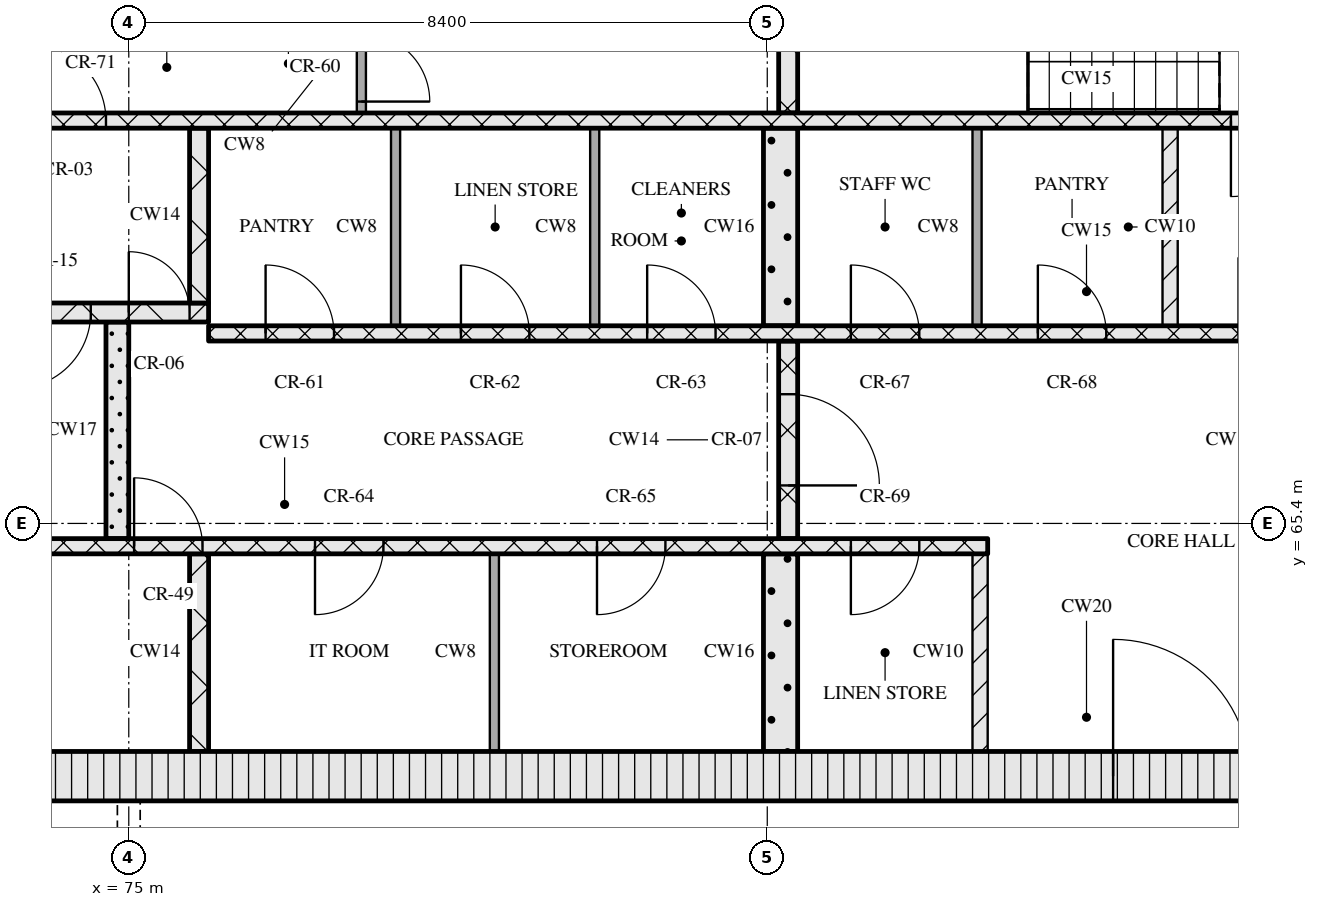
"""IFC4 building model, lengths in metres.
Left out: names, types, materials, properties, quantities, classifications, styles, units other than length and angle.
Written with IfcOpenShell. Run it as: python <this file> out.ifc"""

import sys

from ifc_helpers import new_model, si_unit, direction, frame, frame_2d, origin, place, context, subcontext, project, spatial, rectangle, extrude, element, fill, save


model = new_model("IFC4")
c1 = context("Model", 3, precision=1e-05, world=origin(), true_north=direction((0.0, 1.0)))
c2 = subcontext(c1, "Body", "Model", "MODEL_VIEW")
j1 = project(units=[si_unit("LENGTHUNIT", "METRE"), si_unit("PLANEANGLEUNIT", "RADIAN")], contexts=[c1])
p1 = place(None, origin())
s1 = spatial("IfcSite", under=j1, at=p1, CompositionType="ELEMENT")
p2 = place(p1, origin())
s2 = spatial("IfcBuilding", under=s1, at=p2, CompositionType="ELEMENT")
p3 = place(p2, frame((0.0, 0.0, 241.5)))
s3 = spatial("IfcBuildingStorey", under=s2, at=p3, CompositionType="ELEMENT", Elevation=241.5)
p4 = place(p3, frame((67.15, 62.075, 0.0), z_axis=(0.0, 0.0, 1.0), x_axis=(1.0, 0.0, 0.0)))
e1 = element("IfcWall", 1, at=p4, inside=s3, PredefinedType="SOLIDWALL", context=c2, shape_type="SweptSolid", body=[
    extrude(rectangle(XDim=40.9, YDim=0.65, at=frame_2d((20.45, 0.0))), origin(), (0.0, 0.0, 1.0), 3.32),
])
p5 = place(p4, frame((20.8, 0.0, 0.0)))
e2 = element("IfcOpeningElement", 2, at=p5, cuts=e1, PredefinedType="OPENING", context=c2, shape_type="SweptSolid", body=[
    extrude(rectangle(XDim=1.8, YDim=2.1, at=frame_2d((0.9, 1.05))), frame((0.0, 0.335, 0.0), z_axis=(0.0, -1.0, 0.0), x_axis=(1.0, 0.0, 0.0)), (0.0, 0.0, 1.0), 0.67),
])
p6 = place(p3, frame((75.925, 62.4, 0.0), z_axis=(0.0, 0.0, 1.0), x_axis=(0.0, 1.0, 0.0)))
e3 = element("IfcWall", 3, at=p6, inside=s3, PredefinedType="SOLIDWALL", context=c2, shape_type="SweptSolid", body=[
    extrude(rectangle(XDim=2.6, YDim=0.25, at=frame_2d((1.3, 0.0))), origin(), (0.0, 0.0, 1.0), 3.32),
])
p7 = place(p3, frame((79.81, 62.4, 0.0), z_axis=(0.0, 0.0, 1.0), x_axis=(0.0, 1.0, 0.0)))
e4 = element("IfcWall", 4, at=p7, inside=s3, PredefinedType="PARTITIONING", context=c2, shape_type="SweptSolid", body=[
    extrude(rectangle(XDim=2.6, YDim=0.12, at=frame_2d((1.3, 0.0))), origin(), (0.0, 0.0, 1.0), 3.32),
])
p8 = place(p3, frame((83.575, 62.4, 0.0), z_axis=(0.0, 0.0, 1.0), x_axis=(0.0, 1.0, 0.0)))
e5 = element("IfcWall", 5, at=p8, inside=s3, PredefinedType="SOLIDWALL", context=c2, shape_type="SweptSolid", body=[
    extrude(rectangle(XDim=2.6, YDim=0.45, at=frame_2d((1.3, 0.0))), origin(), (0.0, 0.0, 1.0), 3.32),
])
p9 = place(p3, frame((86.2, 62.4, 0.0), z_axis=(0.0, 0.0, 1.0), x_axis=(0.0, 1.0, 0.0)))
e6 = element("IfcWall", 6, at=p9, inside=s3, PredefinedType="PARTITIONING", context=c2, shape_type="SweptSolid", body=[
    extrude(rectangle(XDim=2.6, YDim=0.2, at=frame_2d((1.3, 0.0))), origin(), (0.0, 0.0, 1.0), 3.32),
])
p10 = place(p3, frame((67.8, 65.1, 0.0), z_axis=(0.0, 0.0, 1.0), x_axis=(1.0, 0.0, 0.0)))
e7 = element("IfcWall", 7, at=p10, inside=s3, PredefinedType="SOLIDWALL", context=c2, shape_type="SweptSolid", body=[
    extrude(rectangle(XDim=18.5, YDim=0.2, at=frame_2d((9.25, 0.0))), origin(), (0.0, 0.0, 1.0), 3.32),
])
p11 = place(p10, frame((7.27, 0.0, 0.0)))
e8 = element("IfcOpeningElement", 8, at=p11, cuts=e7, PredefinedType="OPENING", context=c2, shape_type="SweptSolid", body=[
    extrude(rectangle(XDim=0.9, YDim=2.1, at=frame_2d((0.45, 1.05))), frame((0.0, 0.11, 0.0), z_axis=(0.0, -1.0, 0.0), x_axis=(1.0, 0.0, 0.0)), (0.0, 0.0, 1.0), 0.22),
])
p12 = place(p10, frame((9.65, 0.0, 0.0)))
e9 = element("IfcOpeningElement", 9, at=p12, cuts=e7, PredefinedType="OPENING", context=c2, shape_type="SweptSolid", body=[
    extrude(rectangle(XDim=0.9, YDim=2.1, at=frame_2d((0.45, 1.05))), frame((0.0, 0.11, 0.0), z_axis=(0.0, -1.0, 0.0), x_axis=(1.0, 0.0, 0.0)), (0.0, 0.0, 1.0), 0.22),
])
p13 = place(p10, frame((13.36, 0.0, 0.0)))
e10 = element("IfcOpeningElement", 10, at=p13, cuts=e7, PredefinedType="OPENING", context=c2, shape_type="SweptSolid", body=[
    extrude(rectangle(XDim=0.9, YDim=2.1, at=frame_2d((0.45, 1.05))), frame((0.0, 0.11, 0.0), z_axis=(0.0, -1.0, 0.0), x_axis=(1.0, 0.0, 0.0)), (0.0, 0.0, 1.0), 0.22),
])
p14 = place(p10, frame((16.7, 0.0, 0.0)))
e11 = element("IfcOpeningElement", 11, at=p14, cuts=e7, PredefinedType="OPENING", context=c2, shape_type="SweptSolid", body=[
    extrude(rectangle(XDim=0.9, YDim=2.1, at=frame_2d((0.45, 1.05))), frame((0.0, 0.11, 0.0), z_axis=(0.0, -1.0, 0.0), x_axis=(1.0, 0.0, 0.0)), (0.0, 0.0, 1.0), 0.22),
])
p15 = place(p3, frame((74.85, 65.2, 0.0), z_axis=(0.0, 0.0, 1.0), x_axis=(0.0, 1.0, 0.0)))
e12 = element("IfcWall", 12, at=p15, inside=s3, PredefinedType="SOLIDWALL", context=c2, shape_type="SweptSolid", body=[
    extrude(rectangle(XDim=2.85, YDim=0.3, at=frame_2d((1.425, 0.0))), origin(), (0.0, 0.0, 1.0), 3.32),
])
p16 = place(p3, frame((83.675, 65.2, 0.0), z_axis=(0.0, 0.0, 1.0), x_axis=(0.0, 1.0, 0.0)))
e13 = element("IfcWall", 13, at=p16, inside=s3, PredefinedType="SOLIDWALL", context=c2, shape_type="SweptSolid", body=[
    extrude(rectangle(XDim=2.6, YDim=0.25, at=frame_2d((1.3, 0.0))), origin(), (0.0, 0.0, 1.0), 3.32),
])
p17 = place(p16, frame((0.7, 0.0, 0.0)))
e14 = element("IfcOpeningElement", 14, at=p17, cuts=e13, PredefinedType="OPENING", context=c2, shape_type="SweptSolid", body=[
    extrude(rectangle(XDim=1.2, YDim=2.1, at=frame_2d((0.6, 1.05))), frame((0.0, 0.135, 0.0), z_axis=(0.0, -1.0, 0.0), x_axis=(1.0, 0.0, 0.0)), (0.0, 0.0, 1.0), 0.27),
])
p18 = place(p3, frame((76.05, 67.9, 0.0), z_axis=(0.0, 0.0, 1.0), x_axis=(1.0, 0.0, 0.0)))
e15 = element("IfcWall", 15, at=p18, inside=s3, PredefinedType="SOLIDWALL", context=c2, shape_type="SweptSolid", body=[
    extrude(rectangle(XDim=23.1, YDim=0.2, at=frame_2d((11.55, 0.0))), origin(), (0.0, 0.0, 1.0), 3.32),
])
p19 = place(p18, frame((0.75, 0.0, 0.0)))
e16 = element("IfcOpeningElement", 16, at=p19, cuts=e15, PredefinedType="OPENING", context=c2, shape_type="SweptSolid", body=[
    extrude(rectangle(XDim=0.9, YDim=2.1, at=frame_2d((0.45, 1.05))), frame((0.0, 0.11, 0.0), z_axis=(0.0, -1.0, 0.0), x_axis=(1.0, 0.0, 0.0)), (0.0, 0.0, 1.0), 0.22),
])
p20 = place(p18, frame((3.32, 0.0, 0.0)))
e17 = element("IfcOpeningElement", 17, at=p20, cuts=e15, PredefinedType="OPENING", context=c2, shape_type="SweptSolid", body=[
    extrude(rectangle(XDim=0.9, YDim=2.1, at=frame_2d((0.45, 1.05))), frame((0.0, 0.11, 0.0), z_axis=(0.0, -1.0, 0.0), x_axis=(1.0, 0.0, 0.0)), (0.0, 0.0, 1.0), 0.22),
])
p21 = place(p18, frame((5.77, 0.0, 0.0)))
e18 = element("IfcOpeningElement", 18, at=p21, cuts=e15, PredefinedType="OPENING", context=c2, shape_type="SweptSolid", body=[
    extrude(rectangle(XDim=0.9, YDim=2.1, at=frame_2d((0.45, 1.05))), frame((0.0, 0.11, 0.0), z_axis=(0.0, -1.0, 0.0), x_axis=(1.0, 0.0, 0.0)), (0.0, 0.0, 1.0), 0.22),
])
p22 = place(p18, frame((8.45, 0.0, 0.0)))
e19 = element("IfcOpeningElement", 19, at=p22, cuts=e15, PredefinedType="OPENING", context=c2, shape_type="SweptSolid", body=[
    extrude(rectangle(XDim=0.9, YDim=2.1, at=frame_2d((0.45, 1.05))), frame((0.0, 0.11, 0.0), z_axis=(0.0, -1.0, 0.0), x_axis=(1.0, 0.0, 0.0)), (0.0, 0.0, 1.0), 0.22),
])
p23 = place(p18, frame((10.91, 0.0, 0.0)))
e20 = element("IfcOpeningElement", 20, at=p23, cuts=e15, PredefinedType="OPENING", context=c2, shape_type="SweptSolid", body=[
    extrude(rectangle(XDim=0.9, YDim=2.1, at=frame_2d((0.45, 1.05))), frame((0.0, 0.11, 0.0), z_axis=(0.0, -1.0, 0.0), x_axis=(1.0, 0.0, 0.0)), (0.0, 0.0, 1.0), 0.22),
])
p24 = place(p18, frame((13.55, 0.0, 0.0)))
e21 = element("IfcOpeningElement", 21, at=p24, cuts=e15, PredefinedType="OPENING", context=c2, shape_type="SweptSolid", body=[
    extrude(rectangle(XDim=1.0, YDim=2.1, at=frame_2d((0.5, 1.05))), frame((0.0, 0.11, 0.0), z_axis=(0.0, -1.0, 0.0), x_axis=(1.0, 0.0, 0.0)), (0.0, 0.0, 1.0), 0.22),
])
p25 = place(p18, frame((16.2, 0.0, 0.0)))
e22 = element("IfcOpeningElement", 22, at=p25, cuts=e15, PredefinedType="OPENING", context=c2, shape_type="SweptSolid", body=[
    extrude(rectangle(XDim=1.1, YDim=2.1, at=frame_2d((0.55, 1.05))), frame((0.0, 0.11, 0.0), z_axis=(0.0, -1.0, 0.0), x_axis=(1.0, 0.0, 0.0)), (0.0, 0.0, 1.0), 0.22),
])
p26 = place(p18, frame((18.7, 0.0, 0.0)))
e23 = element("IfcOpeningElement", 23, at=p26, cuts=e15, PredefinedType="OPENING", context=c2, shape_type="SweptSolid", body=[
    extrude(rectangle(XDim=1.1, YDim=2.1, at=frame_2d((0.55, 1.05))), frame((0.0, 0.11, 0.0), z_axis=(0.0, -1.0, 0.0), x_axis=(1.0, 0.0, 0.0)), (0.0, 0.0, 1.0), 0.22),
])
p27 = place(p18, frame((21.2, 0.0, 0.0)))
e24 = element("IfcOpeningElement", 24, at=p27, cuts=e15, PredefinedType="OPENING", context=c2, shape_type="SweptSolid", body=[
    extrude(rectangle(XDim=1.1, YDim=2.1, at=frame_2d((0.55, 1.05))), frame((0.0, 0.11, 0.0), z_axis=(0.0, -1.0, 0.0), x_axis=(1.0, 0.0, 0.0)), (0.0, 0.0, 1.0), 0.22),
])
for number, where, z_axis, x_axis in (
    (25, (78.51, 68.0, 0.0), (0.0, 0.0, 1.0), (0.0, 1.0, 0.0)),
    (26, (81.13, 68.0, 0.0), (0.0, 0.0, 1.0), (0.0, 1.0, 0.0)),
):
    element("IfcWall", number, at=place(p3, frame(where, z_axis=z_axis, x_axis=x_axis)), inside=s3, PredefinedType="PARTITIONING", context=c2, shape_type="SweptSolid", body=[
        extrude(rectangle(XDim=2.6, YDim=0.12, at=frame_2d((1.3, 0.0))), origin(), (0.0, 0.0, 1.0), 3.32),
    ])
p28 = place(p3, frame((83.575, 68.0, 0.0), z_axis=(0.0, 0.0, 1.0), x_axis=(0.0, 1.0, 0.0)))
e27 = element("IfcWall", 27, at=p28, inside=s3, PredefinedType="SOLIDWALL", context=c2, shape_type="SweptSolid", body=[
    extrude(rectangle(XDim=2.6, YDim=0.45, at=frame_2d((1.3, 0.0))), origin(), (0.0, 0.0, 1.0), 3.32),
])
p29 = place(p3, frame((86.16, 68.0, 0.0), z_axis=(0.0, 0.0, 1.0), x_axis=(0.0, 1.0, 0.0)))
e28 = element("IfcWall", 28, at=p29, inside=s3, PredefinedType="PARTITIONING", context=c2, shape_type="SweptSolid", body=[
    extrude(rectangle(XDim=2.6, YDim=0.12, at=frame_2d((1.3, 0.0))), origin(), (0.0, 0.0, 1.0), 3.32),
])
p30 = place(p3, frame((88.7, 68.0, 0.0), z_axis=(0.0, 0.0, 1.0), x_axis=(0.0, 1.0, 0.0)))
e29 = element("IfcWall", 29, at=p30, inside=s3, PredefinedType="PARTITIONING", context=c2, shape_type="SweptSolid", body=[
    extrude(rectangle(XDim=2.6, YDim=0.2, at=frame_2d((1.3, 0.0))), origin(), (0.0, 0.0, 1.0), 3.32),
])
p31 = place(p3, frame((67.8, 68.175, 0.0), z_axis=(0.0, 0.0, 1.0), x_axis=(1.0, 0.0, 0.0)))
e30 = element("IfcWall", 30, at=p31, inside=s3, PredefinedType="SOLIDWALL", context=c2, shape_type="SweptSolid", body=[
    extrude(rectangle(XDim=8.25, YDim=0.25, at=frame_2d((4.125, 0.0))), origin(), (0.0, 0.0, 1.0), 3.32),
])
p32 = place(p31, frame((5.7, 0.0, 0.0)))
e31 = element("IfcOpeningElement", 31, at=p32, cuts=e30, PredefinedType="OPENING", context=c2, shape_type="SweptSolid", body=[
    extrude(rectangle(XDim=1.0, YDim=2.1, at=frame_2d((0.5, 1.05))), frame((0.0, 0.135, 0.0), z_axis=(0.0, -1.0, 0.0), x_axis=(1.0, 0.0, 0.0)), (0.0, 0.0, 1.0), 0.27),
])
p33 = place(p31, frame((7.2, 0.0, 0.0)))
e32 = element("IfcOpeningElement", 32, at=p33, cuts=e30, PredefinedType="OPENING", context=c2, shape_type="SweptSolid", body=[
    extrude(rectangle(XDim=0.8, YDim=2.1, at=frame_2d((0.4, 1.05))), frame((0.0, 0.135, 0.0), z_axis=(0.0, -1.0, 0.0), x_axis=(1.0, 0.0, 0.0)), (0.0, 0.0, 1.0), 0.27),
])
p34 = place(p3, frame((75.925, 68.3, 0.0), z_axis=(0.0, 0.0, 1.0), x_axis=(0.0, 1.0, 0.0)))
e33 = element("IfcWall", 33, at=p34, inside=s3, PredefinedType="SOLIDWALL", context=c2, shape_type="SweptSolid", body=[
    extrude(rectangle(XDim=2.3, YDim=0.25, at=frame_2d((1.15, 0.0))), origin(), (0.0, 0.0, 1.0), 3.32),
])
p35 = place(p3, frame((67.8, 70.7, 0.0), z_axis=(0.0, 0.0, 1.0), x_axis=(1.0, 0.0, 0.0)))
e34 = element("IfcWall", 34, at=p35, inside=s3, PredefinedType="SOLIDWALL", context=c2, shape_type="SweptSolid", body=[
    extrude(rectangle(XDim=39.6, YDim=0.2, at=frame_2d((19.8, 0.0))), origin(), (0.0, 0.0, 1.0), 3.32),
])
p36 = place(p35, frame((0.65, 0.0, 0.0)))
e35 = element("IfcOpeningElement", 35, at=p36, cuts=e34, PredefinedType="OPENING", context=c2, shape_type="SweptSolid", body=[
    extrude(rectangle(XDim=1.1, YDim=2.1, at=frame_2d((0.55, 1.05))), frame((0.0, 0.11, 0.0), z_axis=(0.0, -1.0, 0.0), x_axis=(1.0, 0.0, 0.0)), (0.0, 0.0, 1.0), 0.22),
])
p37 = place(p35, frame((3.25, 0.0, 0.0)))
e36 = element("IfcOpeningElement", 36, at=p37, cuts=e34, PredefinedType="OPENING", context=c2, shape_type="SweptSolid", body=[
    extrude(rectangle(XDim=1.1, YDim=2.1, at=frame_2d((0.55, 1.05))), frame((0.0, 0.11, 0.0), z_axis=(0.0, -1.0, 0.0), x_axis=(1.0, 0.0, 0.0)), (0.0, 0.0, 1.0), 0.22),
])
p38 = place(p35, frame((5.9, 0.0, 0.0)))
e37 = element("IfcOpeningElement", 37, at=p38, cuts=e34, PredefinedType="OPENING", context=c2, shape_type="SweptSolid", body=[
    extrude(rectangle(XDim=1.0, YDim=2.1, at=frame_2d((0.5, 1.05))), frame((0.0, 0.11, 0.0), z_axis=(0.0, -1.0, 0.0), x_axis=(1.0, 0.0, 0.0)), (0.0, 0.0, 1.0), 0.22),
])
p39 = place(p35, frame((21.7, 0.0, 0.0)))
e38 = element("IfcOpeningElement", 38, at=p39, cuts=e34, PredefinedType="OPENING", context=c2, shape_type="SweptSolid", body=[
    extrude(rectangle(XDim=1.0, YDim=2.1, at=frame_2d((0.5, 1.05))), frame((0.0, 0.11, 0.0), z_axis=(0.0, -1.0, 0.0), x_axis=(1.0, 0.0, 0.0)), (0.0, 0.0, 1.0), 0.22),
])
p40 = place(p35, frame((32.7, 0.0, 0.0)))
e39 = element("IfcOpeningElement", 39, at=p40, cuts=e34, PredefinedType="OPENING", context=c2, shape_type="SweptSolid", body=[
    extrude(rectangle(XDim=1.0, YDim=2.1, at=frame_2d((0.5, 1.05))), frame((0.0, 0.11, 0.0), z_axis=(0.0, -1.0, 0.0), x_axis=(1.0, 0.0, 0.0)), (0.0, 0.0, 1.0), 0.22),
])
p41 = place(p35, frame((35.25, 0.0, 0.0)))
e40 = element("IfcOpeningElement", 40, at=p41, cuts=e34, PredefinedType="OPENING", context=c2, shape_type="SweptSolid", body=[
    extrude(rectangle(XDim=1.1, YDim=2.1, at=frame_2d((0.55, 1.05))), frame((0.0, 0.11, 0.0), z_axis=(0.0, -1.0, 0.0), x_axis=(1.0, 0.0, 0.0)), (0.0, 0.0, 1.0), 0.22),
])
p42 = place(p35, frame((37.85, 0.0, 0.0)))
e41 = element("IfcOpeningElement", 41, at=p42, cuts=e34, PredefinedType="OPENING", context=c2, shape_type="SweptSolid", body=[
    extrude(rectangle(XDim=1.1, YDim=2.1, at=frame_2d((0.55, 1.05))), frame((0.0, 0.11, 0.0), z_axis=(0.0, -1.0, 0.0), x_axis=(1.0, 0.0, 0.0)), (0.0, 0.0, 1.0), 0.22),
])
p43 = place(p3, frame((78.06, 70.8, 0.0), z_axis=(0.0, 0.0, 1.0), x_axis=(0.0, 1.0, 0.0)))
e42 = element("IfcWall", 42, at=p43, inside=s3, PredefinedType="PARTITIONING", context=c2, shape_type="SweptSolid", body=[
    extrude(rectangle(XDim=1.2, YDim=0.12, at=frame_2d((0.6, 0.0))), origin(), (0.0, 0.0, 1.0), 3.32),
])
p44 = place(p43, frame((0.15, 0.0, 0.0)))
e43 = element("IfcOpeningElement", 43, at=p44, cuts=e42, PredefinedType="OPENING", context=c2, shape_type="SweptSolid", body=[
    extrude(rectangle(XDim=0.9, YDim=2.1, at=frame_2d((0.45, 1.05))), frame((0.0, 0.07, 0.0), z_axis=(0.0, -1.0, 0.0), x_axis=(1.0, 0.0, 0.0)), (0.0, 0.0, 1.0), 0.14),
])
p45 = place(p3, frame((83.675, 70.8, 0.0), z_axis=(0.0, 0.0, 1.0), x_axis=(0.0, 1.0, 0.0)))
e44 = element("IfcWall", 44, at=p45, inside=s3, PredefinedType="SOLIDWALL", context=c2, shape_type="SweptSolid", body=[
    extrude(rectangle(XDim=2.95, YDim=0.25, at=frame_2d((1.475, 0.0))), origin(), (0.0, 0.0, 1.0), 3.32),
])
p46 = place(p5, origin())
e45 = element("IfcDoor", 45, at=p46, inside=s3, OperationType="DOUBLE_DOOR_SINGLE_SWING", PredefinedType="DOOR", context=c2, shape_type="SweptSolid", body=[
    extrude(rectangle(XDim=1.8, YDim=2.1, at=frame_2d((0.9, 1.05))), frame((0.0, 0.025, 0.0), z_axis=(0.0, -1.0, 0.0), x_axis=(1.0, 0.0, 0.0)), (0.0, 0.0, 1.0), 0.05),
])
fill(e2, e45)
p47 = place(p11, origin())
e46 = element("IfcDoor", 46, at=p47, inside=s3, OperationType="SINGLE_SWING_LEFT", PredefinedType="DOOR", context=c2, shape_type="SweptSolid", body=[
    extrude(rectangle(XDim=0.9, YDim=2.1, at=frame_2d((0.45, 1.05))), frame((0.0, 0.025, 0.0), z_axis=(0.0, -1.0, 0.0), x_axis=(1.0, 0.0, 0.0)), (0.0, 0.0, 1.0), 0.05),
])
fill(e8, e46)
p48 = place(p12, origin())
e47 = element("IfcDoor", 47, at=p48, inside=s3, OperationType="SINGLE_SWING_RIGHT", PredefinedType="DOOR", context=c2, shape_type="SweptSolid", body=[
    extrude(rectangle(XDim=0.9, YDim=2.1, at=frame_2d((0.45, 1.05))), frame((0.0, 0.025, 0.0), z_axis=(0.0, -1.0, 0.0), x_axis=(1.0, 0.0, 0.0)), (0.0, 0.0, 1.0), 0.05),
])
fill(e9, e47)
p49 = place(p13, origin())
e48 = element("IfcDoor", 48, at=p49, inside=s3, OperationType="SINGLE_SWING_RIGHT", PredefinedType="DOOR", context=c2, shape_type="SweptSolid", body=[
    extrude(rectangle(XDim=0.9, YDim=2.1, at=frame_2d((0.45, 1.05))), frame((0.0, 0.025, 0.0), z_axis=(0.0, -1.0, 0.0), x_axis=(1.0, 0.0, 0.0)), (0.0, 0.0, 1.0), 0.05),
])
fill(e10, e48)
p50 = place(p14, origin())
e49 = element("IfcDoor", 49, at=p50, inside=s3, OperationType="SINGLE_SWING_RIGHT", PredefinedType="DOOR", context=c2, shape_type="SweptSolid", body=[
    extrude(rectangle(XDim=0.9, YDim=2.1, at=frame_2d((0.45, 1.05))), frame((0.0, 0.025, 0.0), z_axis=(0.0, -1.0, 0.0), x_axis=(1.0, 0.0, 0.0)), (0.0, 0.0, 1.0), 0.05),
])
fill(e11, e49)
p51 = place(p17, origin())
e50 = element("IfcDoor", 50, at=p51, inside=s3, OperationType="SINGLE_SWING_RIGHT", PredefinedType="DOOR", context=c2, shape_type="SweptSolid", body=[
    extrude(rectangle(XDim=1.2, YDim=2.1, at=frame_2d((0.6, 1.05))), frame((0.0, 0.025, 0.0), z_axis=(0.0, -1.0, 0.0), x_axis=(1.0, 0.0, 0.0)), (0.0, 0.0, 1.0), 0.05),
])
fill(e14, e50)
p52 = place(p19, origin())
e51 = element("IfcDoor", 51, at=p52, inside=s3, OperationType="SINGLE_SWING_LEFT", PredefinedType="DOOR", context=c2, shape_type="SweptSolid", body=[
    extrude(rectangle(XDim=0.9, YDim=2.1, at=frame_2d((0.45, 1.05))), frame((0.0, 0.025, 0.0), z_axis=(0.0, -1.0, 0.0), x_axis=(1.0, 0.0, 0.0)), (0.0, 0.0, 1.0), 0.05),
])
fill(e16, e51)
p53 = place(p20, origin())
e52 = element("IfcDoor", 52, at=p53, inside=s3, OperationType="SINGLE_SWING_LEFT", PredefinedType="DOOR", context=c2, shape_type="SweptSolid", body=[
    extrude(rectangle(XDim=0.9, YDim=2.1, at=frame_2d((0.45, 1.05))), frame((0.0, 0.025, 0.0), z_axis=(0.0, -1.0, 0.0), x_axis=(1.0, 0.0, 0.0)), (0.0, 0.0, 1.0), 0.05),
])
fill(e17, e52)
p54 = place(p21, origin())
e53 = element("IfcDoor", 53, at=p54, inside=s3, OperationType="SINGLE_SWING_LEFT", PredefinedType="DOOR", context=c2, shape_type="SweptSolid", body=[
    extrude(rectangle(XDim=0.9, YDim=2.1, at=frame_2d((0.45, 1.05))), frame((0.0, 0.025, 0.0), z_axis=(0.0, -1.0, 0.0), x_axis=(1.0, 0.0, 0.0)), (0.0, 0.0, 1.0), 0.05),
])
fill(e18, e53)
p55 = place(p22, origin())
e54 = element("IfcDoor", 54, at=p55, inside=s3, OperationType="SINGLE_SWING_LEFT", PredefinedType="DOOR", context=c2, shape_type="SweptSolid", body=[
    extrude(rectangle(XDim=0.9, YDim=2.1, at=frame_2d((0.45, 1.05))), frame((0.0, 0.025, 0.0), z_axis=(0.0, -1.0, 0.0), x_axis=(1.0, 0.0, 0.0)), (0.0, 0.0, 1.0), 0.05),
])
fill(e19, e54)
p56 = place(p23, origin())
e55 = element("IfcDoor", 55, at=p56, inside=s3, OperationType="SINGLE_SWING_LEFT", PredefinedType="DOOR", context=c2, shape_type="SweptSolid", body=[
    extrude(rectangle(XDim=0.9, YDim=2.1, at=frame_2d((0.45, 1.05))), frame((0.0, 0.025, 0.0), z_axis=(0.0, -1.0, 0.0), x_axis=(1.0, 0.0, 0.0)), (0.0, 0.0, 1.0), 0.05),
])
fill(e20, e55)
p57 = place(p32, origin())
e56 = element("IfcDoor", 56, at=p57, inside=s3, OperationType="SINGLE_SWING_RIGHT", PredefinedType="DOOR", context=c2, shape_type="SweptSolid", body=[
    extrude(rectangle(XDim=1.0, YDim=2.1, at=frame_2d((0.5, 1.05))), frame((0.0, 0.025, 0.0), z_axis=(0.0, -1.0, 0.0), x_axis=(1.0, 0.0, 0.0)), (0.0, 0.0, 1.0), 0.05),
])
fill(e31, e56)
p58 = place(p33, origin())
e57 = element("IfcDoor", 57, at=p58, inside=s3, OperationType="SINGLE_SWING_LEFT", PredefinedType="DOOR", context=c2, shape_type="SweptSolid", body=[
    extrude(rectangle(XDim=0.8, YDim=2.1, at=frame_2d((0.4, 1.05))), frame((0.0, 0.025, 0.0), z_axis=(0.0, -1.0, 0.0), x_axis=(1.0, 0.0, 0.0)), (0.0, 0.0, 1.0), 0.05),
])
fill(e32, e57)
p59 = place(p38, origin())
e58 = element("IfcDoor", 58, at=p59, inside=s3, OperationType="SINGLE_SWING_LEFT", PredefinedType="DOOR", context=c2, shape_type="SweptSolid", body=[
    extrude(rectangle(XDim=1.0, YDim=2.1, at=frame_2d((0.5, 1.05))), frame((0.0, 0.025, 0.0), z_axis=(0.0, -1.0, 0.0), x_axis=(1.0, 0.0, 0.0)), (0.0, 0.0, 1.0), 0.05),
])
fill(e37, e58)
p60 = place(p39, origin())
e59 = element("IfcDoor", 59, at=p60, inside=s3, OperationType="SINGLE_SWING_RIGHT", PredefinedType="DOOR", context=c2, shape_type="SweptSolid", body=[
    extrude(rectangle(XDim=1.0, YDim=2.1, at=frame_2d((0.5, 1.05))), frame((0.0, 0.025, 0.0), z_axis=(0.0, -1.0, 0.0), x_axis=(1.0, 0.0, 0.0)), (0.0, 0.0, 1.0), 0.05),
])
fill(e38, e59)
p61 = place(p44, origin())
e60 = element("IfcDoor", 60, at=p61, inside=s3, OperationType="SINGLE_SWING_RIGHT", PredefinedType="DOOR", context=c2, shape_type="SweptSolid", body=[
    extrude(rectangle(XDim=0.9, YDim=2.1, at=frame_2d((0.45, 1.05))), frame((0.0, 0.025, 0.0), z_axis=(0.0, -1.0, 0.0), x_axis=(1.0, 0.0, 0.0)), (0.0, 0.0, 1.0), 0.05),
])
fill(e43, e60)
save(model, sys.argv[1])
